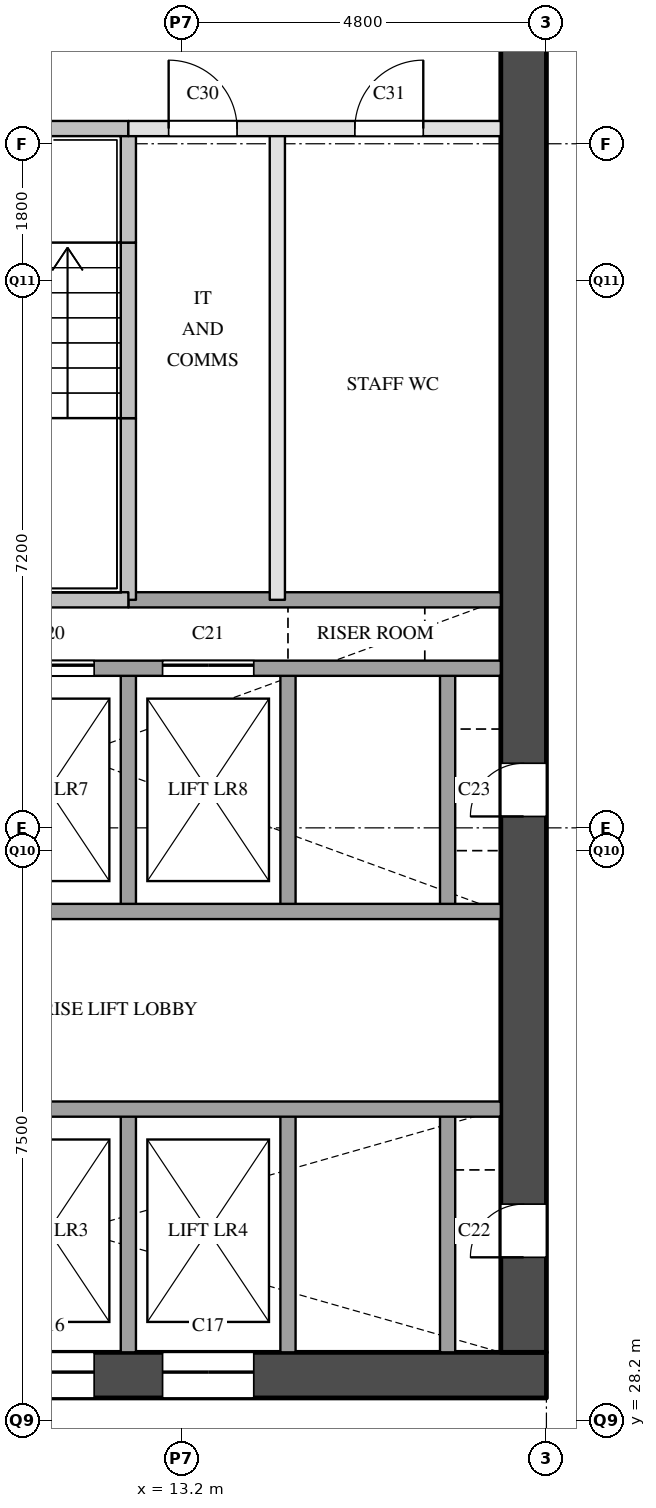
"""IFC4 building model, lengths in metres.
Left out: names, types, materials, properties, quantities, classifications, styles, units other than length and angle.
Written with IfcOpenShell. Run it as: python <this file> out.ifc"""

import sys

from ifc_helpers import new_model, si_unit, direction, frame, frame_2d, origin, place, context, subcontext, project, spatial, rectangle, extrude, element, fill, save


model = new_model("IFC4")
c1 = context("Model", 3, precision=1e-05, world=origin(), true_north=direction((0.0, 1.0)))
c2 = subcontext(c1, "Body", "Model", "MODEL_VIEW")
j1 = project(units=[si_unit("LENGTHUNIT", "METRE"), si_unit("PLANEANGLEUNIT", "RADIAN")], contexts=[c1])
p1 = place(None, origin())
s1 = spatial("IfcSite", under=j1, at=p1, CompositionType="ELEMENT")
p2 = place(p1, origin())
s2 = spatial("IfcBuilding", under=s1, at=p2, CompositionType="ELEMENT")
p3 = place(p2, frame((0.0, 0.0, 72.8)))
s3 = spatial("IfcBuildingStorey", under=s2, at=p3, CompositionType="ELEMENT", Elevation=72.8)
p4 = place(p3, frame((5.6, 28.8, 0.0), z_axis=(0.0, 0.0, 1.0), x_axis=(1.0, 0.0, 0.0)))
e1 = element("IfcWall", 1, at=p4, inside=s3, PredefinedType="SHEAR", context=c2, shape_type="SweptSolid", body=[
    extrude(rectangle(XDim=12.4, YDim=0.6, at=frame_2d((6.2, 0.0))), origin(), (0.0, 0.0, 1.0), 4.7),
])
p5 = place(p4, frame((1.05, 0.0, 0.0)))
e2 = element("IfcOpeningElement", 2, at=p5, cuts=e1, PredefinedType="OPENING", context=c2, shape_type="SweptSolid", body=[
    extrude(rectangle(XDim=1.2, YDim=2.1, at=frame_2d((0.6, 1.05))), frame((0.0, 0.31, 0.0), z_axis=(0.0, -1.0, 0.0), x_axis=(1.0, 0.0, 0.0)), (0.0, 0.0, 1.0), 0.62),
])
p6 = place(p4, frame((5.25, 0.0, 0.0)))
e3 = element("IfcOpeningElement", 3, at=p6, cuts=e1, PredefinedType="OPENING", context=c2, shape_type="SweptSolid", body=[
    extrude(rectangle(XDim=1.2, YDim=2.1, at=frame_2d((0.6, 1.05))), frame((0.0, 0.31, 0.0), z_axis=(0.0, -1.0, 0.0), x_axis=(1.0, 0.0, 0.0)), (0.0, 0.0, 1.0), 0.62),
])
p7 = place(p4, frame((7.35, 0.0, 0.0)))
e4 = element("IfcOpeningElement", 4, at=p7, cuts=e1, PredefinedType="OPENING", context=c2, shape_type="SweptSolid", body=[
    extrude(rectangle(XDim=1.2, YDim=2.1, at=frame_2d((0.6, 1.05))), frame((0.0, 0.31, 0.0), z_axis=(0.0, -1.0, 0.0), x_axis=(1.0, 0.0, 0.0)), (0.0, 0.0, 1.0), 0.62),
])
p8 = place(p3, frame((17.7, 29.1, 0.0), z_axis=(0.0, 0.0, 1.0), x_axis=(0.0, 1.0, 0.0)))
e5 = element("IfcWall", 5, at=p8, inside=s3, PredefinedType="SHEAR", context=c2, shape_type="SweptSolid", body=[
    extrude(rectangle(XDim=20.3, YDim=0.6, at=frame_2d((10.15, 0.0))), origin(), (0.0, 0.0, 1.0), 4.7),
])
p9 = place(p8, frame((1.25, 0.0, 0.0)))
e6 = element("IfcOpeningElement", 6, at=p9, cuts=e5, PredefinedType="OPENING", context=c2, shape_type="SweptSolid", body=[
    extrude(rectangle(XDim=0.7, YDim=2.1, at=frame_2d((0.35, 1.05))), frame((0.0, 0.31, 0.0), z_axis=(0.0, -1.0, 0.0), x_axis=(1.0, 0.0, 0.0)), (0.0, 0.0, 1.0), 0.62),
])
p10 = place(p8, frame((7.05, 0.0, 0.0)))
e7 = element("IfcOpeningElement", 7, at=p10, cuts=e5, PredefinedType="OPENING", context=c2, shape_type="SweptSolid", body=[
    extrude(rectangle(XDim=0.7, YDim=2.1, at=frame_2d((0.35, 1.05))), frame((0.0, 0.31, 0.0), z_axis=(0.0, -1.0, 0.0), x_axis=(1.0, 0.0, 0.0)), (0.0, 0.0, 1.0), 0.62),
])
p11 = place(p3, frame((12.5, 29.1, 0.0), z_axis=(0.0, 0.0, 1.0), x_axis=(0.0, 1.0, 0.0)))
e8 = element("IfcWall", 8, at=p11, inside=s3, PredefinedType="SOLIDWALL", context=c2, shape_type="SweptSolid", body=[
    extrude(rectangle(XDim=3.2, YDim=0.2, at=frame_2d((1.6, 0.0))), origin(), (0.0, 0.0, 1.0), 4.7),
])
p12 = place(p3, frame((12.5, 34.9, 0.0), z_axis=(0.0, 0.0, 1.0), x_axis=(0.0, 1.0, 0.0)))
e9 = element("IfcWall", 9, at=p12, inside=s3, PredefinedType="SOLIDWALL", context=c2, shape_type="SweptSolid", body=[
    extrude(rectangle(XDim=3.2, YDim=0.2, at=frame_2d((1.6, 0.0))), origin(), (0.0, 0.0, 1.0), 4.7),
])
p13 = place(p3, frame((12.5, 39.0, 0.0), z_axis=(0.0, 0.0, 1.0), x_axis=(0.0, 1.0, 0.0)))
e10 = element("IfcWall", 10, at=p13, inside=s3, PredefinedType="SOLIDWALL", context=c2, shape_type="SweptSolid", body=[
    extrude(rectangle(XDim=2.39, YDim=0.2, at=frame_2d((1.195, 0.0))), origin(), (0.0, 0.0, 1.0), 4.7),
])
p14 = place(p3, frame((12.5, 41.39, 0.0), z_axis=(0.0, 0.0, 1.0), x_axis=(0.0, 1.0, 0.0)))
e11 = element("IfcWall", 11, at=p14, inside=s3, PredefinedType="SOLIDWALL", context=c2, shape_type="SweptSolid", body=[
    extrude(rectangle(XDim=2.31, YDim=0.2, at=frame_2d((1.155, 0.0))), origin(), (0.0, 0.0, 1.0), 4.7),
])
p15 = place(p3, frame((12.5, 43.7, 0.0), z_axis=(0.0, 0.0, 1.0), x_axis=(0.0, 1.0, 0.0)))
e12 = element("IfcWall", 12, at=p15, inside=s3, PredefinedType="SOLIDWALL", context=c2, shape_type="SweptSolid", body=[
    extrude(rectangle(XDim=1.5, YDim=0.2, at=frame_2d((0.75, 0.0))), origin(), (0.0, 0.0, 1.0), 4.7),
])
p16 = place(p3, frame((14.46, 39.0, 0.0), z_axis=(0.0, 0.0, 1.0), x_axis=(0.0, 1.0, 0.0)))
e13 = element("IfcWall", 13, at=p16, inside=s3, PredefinedType="PARTITIONING", context=c2, shape_type="SweptSolid", body=[
    extrude(rectangle(XDim=6.2, YDim=0.2, at=frame_2d((3.1, 0.0))), origin(), (0.0, 0.0, 1.0), 4.7),
])
p17 = place(p3, frame((14.6, 29.1, 0.0), z_axis=(0.0, 0.0, 1.0), x_axis=(0.0, 1.0, 0.0)))
e14 = element("IfcWall", 14, at=p17, inside=s3, PredefinedType="SOLIDWALL", context=c2, shape_type="SweptSolid", body=[
    extrude(rectangle(XDim=3.2, YDim=0.2, at=frame_2d((1.6, 0.0))), origin(), (0.0, 0.0, 1.0), 4.7),
])
p18 = place(p3, frame((14.6, 34.9, 0.0), z_axis=(0.0, 0.0, 1.0), x_axis=(0.0, 1.0, 0.0)))
e15 = element("IfcWall", 15, at=p18, inside=s3, PredefinedType="SOLIDWALL", context=c2, shape_type="SweptSolid", body=[
    extrude(rectangle(XDim=3.2, YDim=0.2, at=frame_2d((1.6, 0.0))), origin(), (0.0, 0.0, 1.0), 4.7),
])
p19 = place(p3, frame((16.7, 29.1, 0.0), z_axis=(0.0, 0.0, 1.0), x_axis=(0.0, 1.0, 0.0)))
e16 = element("IfcWall", 16, at=p19, inside=s3, PredefinedType="SOLIDWALL", context=c2, shape_type="SweptSolid", body=[
    extrude(rectangle(XDim=3.2, YDim=0.2, at=frame_2d((1.6, 0.0))), origin(), (0.0, 0.0, 1.0), 4.7),
])
p20 = place(p3, frame((16.7, 34.9, 0.0), z_axis=(0.0, 0.0, 1.0), x_axis=(0.0, 1.0, 0.0)))
e17 = element("IfcWall", 17, at=p20, inside=s3, PredefinedType="SOLIDWALL", context=c2, shape_type="SweptSolid", body=[
    extrude(rectangle(XDim=3.2, YDim=0.2, at=frame_2d((1.6, 0.0))), origin(), (0.0, 0.0, 1.0), 4.7),
])
p21 = place(p3, frame((6.2, 32.3, 0.0), z_axis=(0.0, 0.0, 1.0), x_axis=(1.0, 0.0, 0.0)))
e18 = element("IfcWall", 18, at=p21, inside=s3, PredefinedType="SOLIDWALL", context=c2, shape_type="SweptSolid", body=[
    extrude(rectangle(XDim=11.2, YDim=0.2, at=frame_2d((5.6, 0.0))), origin(), (0.0, 0.0, 1.0), 4.7),
])
p22 = place(p21, frame((2.55, 0.0, 0.0)))
e19 = element("IfcOpeningElement", 19, at=p22, cuts=e18, PredefinedType="OPENING", context=c2, shape_type="SweptSolid", body=[
    extrude(rectangle(XDim=1.2, YDim=2.1, at=frame_2d((0.6, 1.05))), frame((0.0, 0.11, 0.0), z_axis=(0.0, -1.0, 0.0), x_axis=(1.0, 0.0, 0.0)), (0.0, 0.0, 1.0), 0.22),
])
p23 = place(p3, frame((6.2, 34.9, 0.0), z_axis=(0.0, 0.0, 1.0), x_axis=(1.0, 0.0, 0.0)))
e20 = element("IfcWall", 20, at=p23, inside=s3, PredefinedType="SOLIDWALL", context=c2, shape_type="SweptSolid", body=[
    extrude(rectangle(XDim=11.2, YDim=0.2, at=frame_2d((5.6, 0.0))), origin(), (0.0, 0.0, 1.0), 4.7),
])
p24 = place(p3, frame((6.2, 38.1, 0.0), z_axis=(0.0, 0.0, 1.0), x_axis=(1.0, 0.0, 0.0)))
e21 = element("IfcWall", 21, at=p24, inside=s3, PredefinedType="SOLIDWALL", context=c2, shape_type="SweptSolid", body=[
    extrude(rectangle(XDim=11.2, YDim=0.2, at=frame_2d((5.6, 0.0))), origin(), (0.0, 0.0, 1.0), 4.7),
])
p25 = place(p24, frame((0.45, 0.0, 0.0)))
e22 = element("IfcOpeningElement", 22, at=p25, cuts=e21, PredefinedType="OPENING", context=c2, shape_type="SweptSolid", body=[
    extrude(rectangle(XDim=1.2, YDim=2.1, at=frame_2d((0.6, 1.05))), frame((0.0, 0.11, 0.0), z_axis=(0.0, -1.0, 0.0), x_axis=(1.0, 0.0, 0.0)), (0.0, 0.0, 1.0), 0.22),
])
p26 = place(p24, frame((2.55, 0.0, 0.0)))
e23 = element("IfcOpeningElement", 23, at=p26, cuts=e21, PredefinedType="OPENING", context=c2, shape_type="SweptSolid", body=[
    extrude(rectangle(XDim=1.2, YDim=2.1, at=frame_2d((0.6, 1.05))), frame((0.0, 0.11, 0.0), z_axis=(0.0, -1.0, 0.0), x_axis=(1.0, 0.0, 0.0)), (0.0, 0.0, 1.0), 0.22),
])
p27 = place(p24, frame((4.65, 0.0, 0.0)))
e24 = element("IfcOpeningElement", 24, at=p27, cuts=e21, PredefinedType="OPENING", context=c2, shape_type="SweptSolid", body=[
    extrude(rectangle(XDim=1.2, YDim=2.1, at=frame_2d((0.6, 1.05))), frame((0.0, 0.11, 0.0), z_axis=(0.0, -1.0, 0.0), x_axis=(1.0, 0.0, 0.0)), (0.0, 0.0, 1.0), 0.22),
])
p28 = place(p24, frame((6.75, 0.0, 0.0)))
e25 = element("IfcOpeningElement", 25, at=p28, cuts=e21, PredefinedType="OPENING", context=c2, shape_type="SweptSolid", body=[
    extrude(rectangle(XDim=1.2, YDim=2.1, at=frame_2d((0.6, 1.05))), frame((0.0, 0.11, 0.0), z_axis=(0.0, -1.0, 0.0), x_axis=(1.0, 0.0, 0.0)), (0.0, 0.0, 1.0), 0.22),
])
p29 = place(p3, frame((12.5, 39.0, 0.0), z_axis=(0.0, 0.0, 1.0), x_axis=(1.0, 0.0, 0.0)))
e26 = element("IfcWall", 26, at=p29, inside=s3, PredefinedType="SOLIDWALL", context=c2, shape_type="SweptSolid", body=[
    extrude(rectangle(XDim=4.9, YDim=0.2, at=frame_2d((2.45, 0.0))), origin(), (0.0, 0.0, 1.0), 4.7),
])
p30 = place(p3, frame((9.45, 39.0, 0.0), z_axis=(0.0, 0.0, 1.0), x_axis=(1.0, 0.0, 0.0)))
e27 = element("IfcWall", 27, at=p30, inside=s3, PredefinedType="SOLIDWALL", context=c2, shape_type="SweptSolid", body=[
    extrude(rectangle(XDim=3.05, YDim=0.2, at=frame_2d((1.525, 0.0))), origin(), (0.0, 0.0, 1.0), 4.7),
])
p31 = place(p3, frame((12.5, 45.2, 0.0), z_axis=(0.0, 0.0, 1.0), x_axis=(1.0, 0.0, 0.0)))
e28 = element("IfcWall", 28, at=p31, inside=s3, PredefinedType="PARTITIONING", context=c2, shape_type="SweptSolid", body=[
    extrude(rectangle(XDim=4.9, YDim=0.2, at=frame_2d((2.45, 0.0))), origin(), (0.0, 0.0, 1.0), 4.7),
])
p32 = place(p31, frame((0.53, 0.0, 0.0)))
e29 = element("IfcOpeningElement", 29, at=p32, cuts=e28, PredefinedType="OPENING", context=c2, shape_type="SweptSolid", body=[
    extrude(rectangle(XDim=0.9, YDim=2.1, at=frame_2d((0.45, 1.05))), frame((0.0, 0.11, 0.0), z_axis=(0.0, -1.0, 0.0), x_axis=(1.0, 0.0, 0.0)), (0.0, 0.0, 1.0), 0.22),
])
p33 = place(p31, frame((2.98, 0.0, 0.0)))
e30 = element("IfcOpeningElement", 30, at=p33, cuts=e28, PredefinedType="OPENING", context=c2, shape_type="SweptSolid", body=[
    extrude(rectangle(XDim=0.9, YDim=2.1, at=frame_2d((0.45, 1.05))), frame((0.0, 0.11, 0.0), z_axis=(0.0, -1.0, 0.0), x_axis=(1.0, 0.0, 0.0)), (0.0, 0.0, 1.0), 0.22),
])
p34 = place(p3, frame((9.45, 45.2, 0.0), z_axis=(0.0, 0.0, 1.0), x_axis=(1.0, 0.0, 0.0)))
e31 = element("IfcWall", 31, at=p34, inside=s3, PredefinedType="SOLIDWALL", context=c2, shape_type="SweptSolid", body=[
    extrude(rectangle(XDim=3.05, YDim=0.2, at=frame_2d((1.525, 0.0))), origin(), (0.0, 0.0, 1.0), 4.7),
])
p35 = place(p34, frame((0.925, 0.0, 0.0)))
e32 = element("IfcOpeningElement", 32, at=p35, cuts=e31, PredefinedType="OPENING", context=c2, shape_type="SweptSolid", body=[
    extrude(rectangle(XDim=1.1, YDim=2.1, at=frame_2d((0.55, 1.05))), frame((0.0, 0.11, 0.0), z_axis=(0.0, -1.0, 0.0), x_axis=(1.0, 0.0, 0.0)), (0.0, 0.0, 1.0), 0.22),
])
p36 = place(p6, origin())
e33 = element("IfcDoor", 33, at=p36, inside=s3, OperationType="SLIDING_TO_LEFT", PredefinedType="DOOR", context=c2, shape_type="SweptSolid", body=[
    extrude(rectangle(XDim=1.2, YDim=2.1, at=frame_2d((0.6, 1.05))), frame((0.0, 0.025, 0.0), z_axis=(0.0, -1.0, 0.0), x_axis=(1.0, 0.0, 0.0)), (0.0, 0.0, 1.0), 0.05),
])
fill(e3, e33)
p37 = place(p7, origin())
e34 = element("IfcDoor", 34, at=p37, inside=s3, OperationType="SLIDING_TO_LEFT", PredefinedType="DOOR", context=c2, shape_type="SweptSolid", body=[
    extrude(rectangle(XDim=1.2, YDim=2.1, at=frame_2d((0.6, 1.05))), frame((0.0, 0.025, 0.0), z_axis=(0.0, -1.0, 0.0), x_axis=(1.0, 0.0, 0.0)), (0.0, 0.0, 1.0), 0.05),
])
fill(e4, e34)
p38 = place(p27, origin())
e35 = element("IfcDoor", 35, at=p38, inside=s3, OperationType="SLIDING_TO_LEFT", PredefinedType="DOOR", context=c2, shape_type="SweptSolid", body=[
    extrude(rectangle(XDim=1.2, YDim=2.1, at=frame_2d((0.6, 1.05))), frame((0.0, 0.025, 0.0), z_axis=(0.0, -1.0, 0.0), x_axis=(1.0, 0.0, 0.0)), (0.0, 0.0, 1.0), 0.05),
])
fill(e24, e35)
p39 = place(p28, origin())
e36 = element("IfcDoor", 36, at=p39, inside=s3, OperationType="SLIDING_TO_LEFT", PredefinedType="DOOR", context=c2, shape_type="SweptSolid", body=[
    extrude(rectangle(XDim=1.2, YDim=2.1, at=frame_2d((0.6, 1.05))), frame((0.0, 0.025, 0.0), z_axis=(0.0, -1.0, 0.0), x_axis=(1.0, 0.0, 0.0)), (0.0, 0.0, 1.0), 0.05),
])
fill(e25, e36)
p40 = place(p9, origin())
e37 = element("IfcDoor", 37, at=p40, inside=s3, OperationType="SINGLE_SWING_LEFT", PredefinedType="DOOR", context=c2, shape_type="SweptSolid", body=[
    extrude(rectangle(XDim=0.7, YDim=2.1, at=frame_2d((0.35, 1.05))), frame((0.0, 0.025, 0.0), z_axis=(0.0, -1.0, 0.0), x_axis=(1.0, 0.0, 0.0)), (0.0, 0.0, 1.0), 0.05),
])
fill(e6, e37)
p41 = place(p10, origin())
e38 = element("IfcDoor", 38, at=p41, inside=s3, OperationType="SINGLE_SWING_LEFT", PredefinedType="DOOR", context=c2, shape_type="SweptSolid", body=[
    extrude(rectangle(XDim=0.7, YDim=2.1, at=frame_2d((0.35, 1.05))), frame((0.0, 0.025, 0.0), z_axis=(0.0, -1.0, 0.0), x_axis=(1.0, 0.0, 0.0)), (0.0, 0.0, 1.0), 0.05),
])
fill(e7, e38)
p42 = place(p32, origin())
e39 = element("IfcDoor", 39, at=p42, inside=s3, OperationType="SINGLE_SWING_LEFT", PredefinedType="DOOR", context=c2, shape_type="SweptSolid", body=[
    extrude(rectangle(XDim=0.9, YDim=2.1, at=frame_2d((0.45, 1.05))), frame((0.0, 0.025, 0.0), z_axis=(0.0, -1.0, 0.0), x_axis=(1.0, 0.0, 0.0)), (0.0, 0.0, 1.0), 0.05),
])
fill(e29, e39)
p43 = place(p33, origin())
e40 = element("IfcDoor", 40, at=p43, inside=s3, OperationType="SINGLE_SWING_RIGHT", PredefinedType="DOOR", context=c2, shape_type="SweptSolid", body=[
    extrude(rectangle(XDim=0.9, YDim=2.1, at=frame_2d((0.45, 1.05))), frame((0.0, 0.025, 0.0), z_axis=(0.0, -1.0, 0.0), x_axis=(1.0, 0.0, 0.0)), (0.0, 0.0, 1.0), 0.05),
])
fill(e30, e40)
save(model, sys.argv[1])
